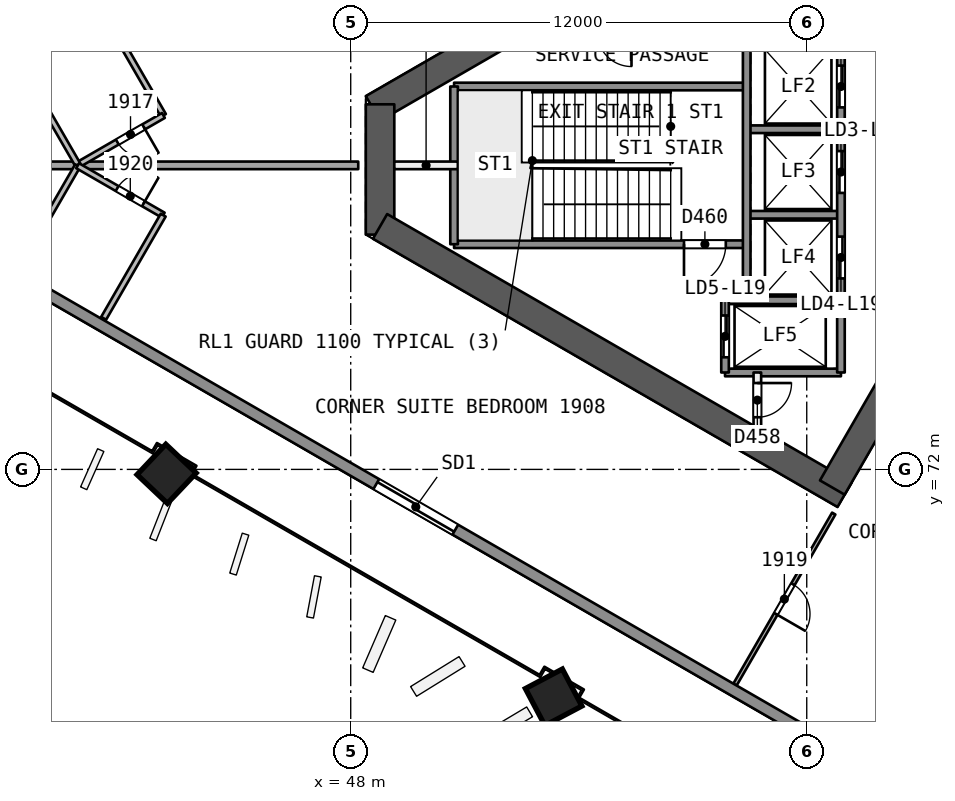
"""IFC4 building model, lengths in metres.
Left out: names, types, materials, properties, quantities, classifications, styles, units other than length and angle.
Written with IfcOpenShell. Run it as: python <this file> out.ifc"""

import sys

from ifc_helpers import new_model, si_unit, direction, frame, frame_2d, origin, origin_2d, place, context, subcontext, project, spatial, rectangle, extrude, element, fill, save


model = new_model("IFC4")
c1 = context("Model", 3, precision=1e-05, world=origin(), true_north=direction((0.0, 1.0)))
c2 = subcontext(c1, "Body", "Model", "MODEL_VIEW")
j1 = project(units=[si_unit("LENGTHUNIT", "METRE"), si_unit("PLANEANGLEUNIT", "RADIAN")], contexts=[c1])
p1 = place(None, origin())
s1 = spatial("IfcSite", under=j1, at=p1, CompositionType="ELEMENT")
p2 = place(p1, origin())
s2 = spatial("IfcBuilding", under=s1, at=p2, CompositionType="ELEMENT")
p3 = place(p2, frame((0.0, 0.0, 83.2)))
s3 = spatial("IfcBuildingStorey", under=s2, at=p3, CompositionType="ELEMENT", Elevation=83.2)
p4 = place(p3, frame((65.567, 80.0, 0.0), z_axis=(0.0, 0.0, 1.0), x_axis=(-0.499988615364, 0.866031976607, 0.0)))
e1 = element("IfcWall", 1, at=p4, inside=s3, PredefinedType="SHEAR", context=c2, shape_type="SweptSolid", body=[
    extrude(rectangle(XDim=10.163, YDim=0.75, at=frame_2d((5.082, 0.0))), origin(), (0.0, 0.0, 1.0), 3.7),
])
p5 = place(p4, frame((0.733, 0.0, 0.0)))
e2 = element("IfcOpeningElement", 2, at=p5, cuts=e1, PredefinedType="OPENING", context=c2, shape_type="SweptSolid", body=[
    extrude(rectangle(XDim=1.2, YDim=2.1, at=frame_2d((0.6, 1.05))), frame((0.0, 0.385, 0.0), z_axis=(0.0, -1.0, 0.0), x_axis=(1.0, 0.0, 0.0)), (0.0, 0.0, 1.0), 0.771),
])
p6 = place(p3, frame((60.673, 88.477, 0.0), z_axis=(0.0, 0.0, 1.0), x_axis=(-0.8660248072, -0.500001033313, 0.0)))
e3 = element("IfcWall", 3, at=p6, inside=s3, PredefinedType="SHEAR", context=c2, shape_type="SweptSolid", body=[
    extrude(rectangle(XDim=13.958, YDim=0.75, at=frame_2d((6.979, 0.0))), origin(), (0.0, 0.0, 1.0), 3.7),
])
p7 = place(p3, frame((48.772, 81.606, 0.0), z_axis=(0.0, 0.0, 1.0), x_axis=(0.0, -1.0, 0.0)))
e4 = element("IfcWall", 4, at=p7, inside=s3, PredefinedType="SHEAR", context=c2, shape_type="SweptSolid", body=[
    extrude(rectangle(XDim=3.429, YDim=0.75, at=frame_2d((1.714, 0.0))), origin(), (0.0, 0.0, 1.0), 3.7),
])
p8 = place(p3, frame((48.772, 78.394, 0.0), z_axis=(0.0, 0.0, 1.0), x_axis=(0.866028339916, -0.499994914436, 0.0)))
e5 = element("IfcWall", 5, at=p8, inside=s3, PredefinedType="SHEAR", context=c2, shape_type="SweptSolid", body=[
    extrude(rectangle(XDim=14.117, YDim=0.75, at=frame_2d((7.059, 0.0))), origin(), (0.0, 0.0, 1.0), 3.7),
])
p9 = place(p3, frame((60.673, 71.523, 0.0), z_axis=(0.0, 0.0, 1.0), x_axis=(0.499997052475, 0.866027105532, 0.0)))
e6 = element("IfcWall", 6, at=p9, inside=s3, PredefinedType="SHEAR", context=c2, shape_type="SweptSolid", body=[
    extrude(rectangle(XDim=10.005, YDim=0.75, at=frame_2d((5.002, 0.0))), origin(), (0.0, 0.0, 1.0), 3.7),
])
p10 = place(p9, frame((7.855, 0.0, 0.0)))
e7 = element("IfcOpeningElement", 7, at=p10, cuts=e6, PredefinedType="OPENING", context=c2, shape_type="SweptSolid", body=[
    extrude(rectangle(XDim=1.2, YDim=2.1, at=frame_2d((0.6, 1.05))), frame((0.0, 0.385, 0.0), z_axis=(0.0, -1.0, 0.0), x_axis=(1.0, 0.0, 0.0)), (0.0, 0.0, 1.0), 0.771),
])
p11 = place(p3, frame((43.121, 71.875, 0.0), z_axis=(0.02855911485, 0.006793507689, 0.999569019734), x_axis=(-0.865319840559, 0.500766443848, 0.021319996519)))
e8 = element("IfcColumn", 8, at=p11, inside=s3, PredefinedType="COLUMN", context=c2, shape_type="SweptSolid", body=[
    extrude(rectangle(XDim=1.1, YDim=1.1, at=origin_2d()), origin(), (0.0, 0.0, 1.0), 3.702),
])
p12 = place(p3, frame((53.317, 65.989, 0.0), z_axis=(0.019328516974, 0.012138044789, 0.999739504221), x_axis=(-0.865694061334, 0.500459928951, 0.010660754407)))
e9 = element("IfcColumn", 9, at=p12, inside=s3, PredefinedType="COLUMN", context=c2, shape_type="SweptSolid", body=[
    extrude(rectangle(XDim=1.1, YDim=1.1, at=origin_2d()), origin(), (0.0, 0.0, 1.0), 3.701),
])
p13 = place(p3, frame((41.504, 84.028, 0.0), z_axis=(0.0, 0.0, 1.0), x_axis=(0.499967424082, -0.866044210682, 0.0)))
e10 = element("IfcWall", 10, at=p13, inside=s3, PredefinedType="PARTITIONING", context=c2, shape_type="SweptSolid", body=[
    extrude(rectangle(XDim=3.135, YDim=0.15, at=frame_2d((1.567, 0.0))), origin(), (0.0, 0.0, 1.0), 3.2),
])
p14 = place(p3, frame((43.072, 81.313, 0.0), z_axis=(0.0, 0.0, 1.0), x_axis=(-0.866021400173, -0.500006934395, 0.0)))
e11 = element("IfcWall", 11, at=p14, inside=s3, PredefinedType="PARTITIONING", context=c2, shape_type="SweptSolid", body=[
    extrude(rectangle(XDim=2.6, YDim=0.15, at=frame_2d((1.3, 0.0))), origin(), (0.0, 0.0, 1.0), 3.2),
])
p15 = place(p14, frame((0.6, 0.0, 0.0)))
e12 = element("IfcOpeningElement", 12, at=p15, cuts=e11, PredefinedType="OPENING", context=c2, shape_type="SweptSolid", body=[
    extrude(rectangle(XDim=0.8, YDim=2.1, at=frame_2d((0.4, 1.05))), frame((0.0, 0.085, 0.0), z_axis=(0.0, -1.0, 0.0), x_axis=(1.0, 0.0, 0.0)), (0.0, 0.0, 1.0), 0.171),
])
p16 = place(p3, frame((40.82, 80.013, 0.0), z_axis=(0.0, 0.0, 1.0), x_axis=(-0.499995114243, 0.866028224559, 0.0)))
e13 = element("IfcWall", 13, at=p16, inside=s3, PredefinedType="PARTITIONING", context=c2, shape_type="SweptSolid", body=[
    extrude(rectangle(XDim=2.635, YDim=0.15, at=frame_2d((1.318, 0.0))), origin(), (0.0, 0.0, 1.0), 3.2),
])
p17 = place(p3, frame((39.502, 80.0, 0.0), z_axis=(0.0, 0.0, 1.0), x_axis=(1.0, 0.0, 0.0)))
e14 = element("IfcWall", 14, at=p17, inside=s3, PredefinedType="PARTITIONING", context=c2, shape_type="SweptSolid", body=[
    extrude(rectangle(XDim=8.696, YDim=0.2, at=frame_2d((4.348, 0.0))), origin(), (0.0, 0.0, 1.0), 3.2),
])
p18 = place(p3, frame((60.71, 70.838, 0.0), z_axis=(0.0, 0.0, 1.0), x_axis=(-0.499973171224, -0.866040892832, 0.0)))
e15 = element("IfcWall", 15, at=p18, inside=s3, PredefinedType="PARTITIONING", context=c2, shape_type="SweptSolid", body=[
    extrude(rectangle(XDim=5.198, YDim=0.1, at=frame_2d((2.599, 0.0))), origin(), (0.0, 0.0, 1.0), 3.2),
])
p19 = place(p18, frame((2.149, 0.0, 0.0)))
e16 = element("IfcOpeningElement", 16, at=p19, cuts=e15, PredefinedType="OPENING", context=c2, shape_type="SweptSolid", body=[
    extrude(rectangle(XDim=0.9, YDim=2.1, at=frame_2d((0.45, 1.05))), frame((0.0, 0.061, 0.0), z_axis=(0.0, -1.0, 0.0), x_axis=(1.0, 0.0, 0.0)), (0.0, 0.0, 1.0), 0.121),
])
p20 = place(p3, frame((39.502, 77.718, 0.0), z_axis=(0.0, 0.0, 1.0), x_axis=(0.499972156837, 0.866041478445, 0.0)))
e17 = element("IfcWall", 17, at=p20, inside=s3, PredefinedType="PARTITIONING", context=c2, shape_type="SweptSolid", body=[
    extrude(rectangle(XDim=2.624, YDim=0.15, at=frame_2d((1.312, 0.0))), origin(), (0.0, 0.0, 1.0), 3.2),
])
p21 = place(p3, frame((40.814, 79.99, 0.0), z_axis=(0.0, 0.0, 1.0), x_axis=(0.866062058628, -0.499936506574, 0.0)))
e18 = element("IfcWall", 18, at=p21, inside=s3, PredefinedType="PARTITIONING", context=c2, shape_type="SweptSolid", body=[
    extrude(rectangle(XDim=2.6, YDim=0.15, at=frame_2d((1.3, 0.0))), origin(), (0.0, 0.0, 1.0), 3.2),
])
p22 = place(p21, frame((1.2, 0.0, 0.0)))
e19 = element("IfcOpeningElement", 19, at=p22, cuts=e18, PredefinedType="OPENING", context=c2, shape_type="SweptSolid", body=[
    extrude(rectangle(XDim=0.8, YDim=2.1, at=frame_2d((0.4, 1.05))), frame((0.0, 0.085, 0.0), z_axis=(0.0, -1.0, 0.0), x_axis=(1.0, 0.0, 0.0)), (0.0, 0.0, 1.0), 0.171),
])
p23 = place(p3, frame((43.066, 78.69, 0.0), z_axis=(0.0, 0.0, 1.0), x_axis=(-0.499967424082, -0.866044210682, 0.0)))
e20 = element("IfcWall", 20, at=p23, inside=s3, PredefinedType="PARTITIONING", context=c2, shape_type="SweptSolid", body=[
    extrude(rectangle(XDim=3.135, YDim=0.15, at=frame_2d((1.567, 0.0))), origin(), (0.0, 0.0, 1.0), 3.2),
])
p24 = place(p3, frame((39.353, 83.005, 0.0), z_axis=(0.0, 0.0, 1.0), x_axis=(0.866025832118, 0.499999258104, 0.0)))
e21 = element("IfcWall", 21, at=p24, inside=s3, PredefinedType="SOLIDWALL", context=c2, shape_type="SweptSolid", body=[
    extrude(rectangle(XDim=58.737, YDim=0.3, at=frame_2d((29.368, 0.0))), origin(), (0.0, 0.0, 1.0), 3.2),
])
p25 = place(p24, frame((28.636, 0.0, 0.0)))
e22 = element("IfcOpeningElement", 22, at=p25, cuts=e21, PredefinedType="OPENING", context=c2, shape_type="SweptSolid", body=[
    extrude(rectangle(XDim=2.4, YDim=2.4, at=frame_2d((1.2, 1.2))), frame((0.0, 0.161, 0.0), z_axis=(0.0, -1.0, 0.0), x_axis=(1.0, 0.0, 0.0)), (0.0, 0.0, 1.0), 0.321),
])
p26 = place(p24, frame((33.936, 0.0, 0.0)))
e23 = element("IfcOpeningElement", 23, at=p26, cuts=e21, PredefinedType="OPENING", context=c2, shape_type="SweptSolid", body=[
    extrude(rectangle(XDim=2.4, YDim=2.4, at=frame_2d((1.2, 1.2))), frame((0.0, 0.161, 0.0), z_axis=(0.0, -1.0, 0.0), x_axis=(1.0, 0.0, 0.0)), (0.0, 0.0, 1.0), 0.321),
])
p27 = place(p24, frame((45.575, 0.0, 0.0)))
e24 = element("IfcOpeningElement", 24, at=p27, cuts=e21, PredefinedType="OPENING", context=c2, shape_type="SweptSolid", body=[
    extrude(rectangle(XDim=2.4, YDim=2.4, at=frame_2d((1.2, 1.2))), frame((0.0, 0.161, 0.0), z_axis=(0.0, -1.0, 0.0), x_axis=(1.0, 0.0, 0.0)), (0.0, 0.0, 1.0), 0.321),
])
p28 = place(p24, frame((22.868, 0.0, 0.0)))
e25 = element("IfcOpeningElement", 25, at=p28, cuts=e21, PredefinedType="OPENING", context=c2, shape_type="SweptSolid", body=[
    extrude(rectangle(XDim=2.4, YDim=2.4, at=frame_2d((1.2, 1.2))), frame((0.0, 0.161, 0.0), z_axis=(0.0, -1.0, 0.0), x_axis=(1.0, 0.0, 0.0)), (0.0, 0.0, 1.0), 0.321),
])
p29 = place(p24, frame((10.765, 0.0, 0.0)))
e26 = element("IfcOpeningElement", 26, at=p29, cuts=e21, PredefinedType="OPENING", context=c2, shape_type="SweptSolid", body=[
    extrude(rectangle(XDim=2.4, YDim=2.4, at=frame_2d((1.2, 1.2))), frame((0.0, 0.161, 0.0), z_axis=(0.0, -1.0, 0.0), x_axis=(1.0, 0.0, 0.0)), (0.0, 0.0, 1.0), 0.321),
])
p30 = place(p3, frame((90.221, 47.626, 0.0), z_axis=(0.0, 0.0, 1.0), x_axis=(-0.866025832118, 0.499999258104, 0.0)))
e27 = element("IfcWall", 27, at=p30, inside=s3, PredefinedType="SOLIDWALL", context=c2, shape_type="SweptSolid", body=[
    extrude(rectangle(XDim=58.737, YDim=0.3, at=frame_2d((29.368, 0.0))), origin(), (0.0, 0.0, 1.0), 3.2),
])
p31 = place(p30, frame((32.065, 0.0, 0.0)))
e28 = element("IfcOpeningElement", 28, at=p31, cuts=e27, PredefinedType="OPENING", context=c2, shape_type="SweptSolid", body=[
    extrude(rectangle(XDim=2.4, YDim=2.4, at=frame_2d((1.2, 1.2))), frame((0.0, 0.161, 0.0), z_axis=(0.0, -1.0, 0.0), x_axis=(1.0, 0.0, 0.0)), (0.0, 0.0, 1.0), 0.321),
])
p32 = place(p30, frame((45.575, 0.0, 0.0)))
e29 = element("IfcOpeningElement", 29, at=p32, cuts=e27, PredefinedType="OPENING", context=c2, shape_type="SweptSolid", body=[
    extrude(rectangle(XDim=2.4, YDim=2.4, at=frame_2d((1.2, 1.2))), frame((0.0, 0.161, 0.0), z_axis=(0.0, -1.0, 0.0), x_axis=(1.0, 0.0, 0.0)), (0.0, 0.0, 1.0), 0.321),
])
p33 = place(p30, frame((13.441, 0.0, 0.0)))
e30 = element("IfcOpeningElement", 30, at=p33, cuts=e27, PredefinedType="OPENING", context=c2, shape_type="SweptSolid", body=[
    extrude(rectangle(XDim=2.4, YDim=2.4, at=frame_2d((1.2, 1.2))), frame((0.0, 0.161, 0.0), z_axis=(0.0, -1.0, 0.0), x_axis=(1.0, 0.0, 0.0)), (0.0, 0.0, 1.0), 0.321),
])
p34 = place(p3, frame((58.42, 82.075, 0.0), z_axis=(0.0, 0.0, 1.0), x_axis=(-1.0, 0.0, 0.0)))
e31 = element("IfcWall", 31, at=p34, inside=s3, PredefinedType="SOLIDWALL", context=c2, shape_type="SweptSolid", body=[
    extrude(rectangle(XDim=7.7, YDim=0.2, at=frame_2d((3.85, 0.0))), origin(), (0.0, 0.0, 1.0), 3.2),
])
p35 = place(p3, frame((60.9, 80.95, 0.0), z_axis=(0.0, 0.0, 1.0), x_axis=(-1.0, 0.0, 0.0)))
e32 = element("IfcWall", 32, at=p35, inside=s3, PredefinedType="SOLIDWALL", context=c2, shape_type="SweptSolid", body=[
    extrude(rectangle(XDim=2.48, YDim=0.2, at=frame_2d((1.24, 0.0))), origin(), (0.0, 0.0, 1.0), 3.2),
])
p36 = place(p3, frame((50.82, 80.0, 0.0), z_axis=(0.0, 0.0, 1.0), x_axis=(-1.0, 0.0, 0.0)))
e33 = element("IfcWall", 33, at=p36, inside=s3, PredefinedType="PARTITIONING", context=c2, shape_type="SweptSolid", body=[
    extrude(rectangle(XDim=1.673, YDim=0.2, at=frame_2d((0.836, 0.0))), origin(), (0.0, 0.0, 1.0), 3.2),
])
p37 = place(p3, frame((60.9, 78.7, 0.0), z_axis=(0.0, 0.0, 1.0), x_axis=(-1.0, 0.0, 0.0)))
e34 = element("IfcWall", 34, at=p37, inside=s3, PredefinedType="SOLIDWALL", context=c2, shape_type="SweptSolid", body=[
    extrude(rectangle(XDim=2.48, YDim=0.2, at=frame_2d((1.24, 0.0))), origin(), (0.0, 0.0, 1.0), 3.2),
])
p38 = place(p3, frame((58.42, 77.925, 0.0), z_axis=(0.0, 0.0, 1.0), x_axis=(-1.0, 0.0, 0.0)))
e35 = element("IfcWall", 35, at=p38, inside=s3, PredefinedType="SOLIDWALL", context=c2, shape_type="SweptSolid", body=[
    extrude(rectangle(XDim=7.7, YDim=0.2, at=frame_2d((3.85, 0.0))), origin(), (0.0, 0.0, 1.0), 3.2),
])
p39 = place(p38, frame((0.55, 0.0, 0.0)))
e36 = element("IfcOpeningElement", 36, at=p39, cuts=e35, PredefinedType="OPENING", context=c2, shape_type="SweptSolid", body=[
    extrude(rectangle(XDim=1.1, YDim=2.1, at=frame_2d((0.55, 1.05))), frame((0.0, 0.11, 0.0), z_axis=(0.0, -1.0, 0.0), x_axis=(1.0, 0.0, 0.0)), (0.0, 0.0, 1.0), 0.221),
])
for number, where, z_axis, x_axis in (
    (37, (60.9, 76.45, 0.0), (0.0, 0.0, 1.0), (-1.0, 0.0, 0.0)),
    (38, (60.9, 74.55, 0.0), (0.0, 0.0, 1.0), (-1.0, 0.0, 0.0)),
):
    element("IfcWall", number, at=place(p3, frame(where, z_axis=z_axis, x_axis=x_axis)), inside=s3, PredefinedType="SOLIDWALL", context=c2, shape_type="SweptSolid", body=[
        extrude(rectangle(XDim=3.05, YDim=0.2, at=frame_2d((1.525, 0.0))), origin(), (0.0, 0.0, 1.0), 3.2),
    ])
p40 = place(p3, frame((60.9, 85.45, 0.0), z_axis=(0.0, 0.0, 1.0), x_axis=(0.0, -1.0, 0.0)))
e39 = element("IfcWall", 39, at=p40, inside=s3, PredefinedType="SOLIDWALL", context=c2, shape_type="SweptSolid", body=[
    extrude(rectangle(XDim=10.9, YDim=0.2, at=frame_2d((5.45, 0.0))), origin(), (0.0, 0.0, 1.0), 3.2),
])
p41 = place(p40, frame((0.575, 0.0, 0.0)))
e40 = element("IfcOpeningElement", 40, at=p41, cuts=e39, PredefinedType="OPENING", context=c2, shape_type="SweptSolid", body=[
    extrude(rectangle(XDim=1.1, YDim=2.1, at=frame_2d((0.55, 1.05))), frame((0.0, 0.11, 0.0), z_axis=(0.0, -1.0, 0.0), x_axis=(1.0, 0.0, 0.0)), (0.0, 0.0, 1.0), 0.221),
])
p42 = place(p40, frame((2.825, 0.0, 0.0)))
e41 = element("IfcOpeningElement", 41, at=p42, cuts=e39, PredefinedType="OPENING", context=c2, shape_type="SweptSolid", body=[
    extrude(rectangle(XDim=1.1, YDim=2.1, at=frame_2d((0.55, 1.05))), frame((0.0, 0.11, 0.0), z_axis=(0.0, -1.0, 0.0), x_axis=(1.0, 0.0, 0.0)), (0.0, 0.0, 1.0), 0.221),
])
p43 = place(p40, frame((5.075, 0.0, 0.0)))
e42 = element("IfcOpeningElement", 42, at=p43, cuts=e39, PredefinedType="OPENING", context=c2, shape_type="SweptSolid", body=[
    extrude(rectangle(XDim=1.1, YDim=2.1, at=frame_2d((0.55, 1.05))), frame((0.0, 0.11, 0.0), z_axis=(0.0, -1.0, 0.0), x_axis=(1.0, 0.0, 0.0)), (0.0, 0.0, 1.0), 0.221),
])
p44 = place(p40, frame((7.325, 0.0, 0.0)))
e43 = element("IfcOpeningElement", 43, at=p44, cuts=e39, PredefinedType="OPENING", context=c2, shape_type="SweptSolid", body=[
    extrude(rectangle(XDim=1.1, YDim=2.1, at=frame_2d((0.55, 1.05))), frame((0.0, 0.11, 0.0), z_axis=(0.0, -1.0, 0.0), x_axis=(1.0, 0.0, 0.0)), (0.0, 0.0, 1.0), 0.221),
])
p45 = place(p3, frame((58.7, 74.55, 0.0), z_axis=(0.0, 0.0, 1.0), x_axis=(0.0, -1.0, 0.0)))
e44 = element("IfcWall", 44, at=p45, inside=s3, PredefinedType="PARTITIONING", context=c2, shape_type="SweptSolid", body=[
    extrude(rectangle(XDim=1.455, YDim=0.2, at=frame_2d((0.728, 0.0))), origin(), (0.0, 0.0, 1.0), 3.2),
])
p46 = place(p45, frame((0.278, 0.0, 0.0)))
e45 = element("IfcOpeningElement", 45, at=p46, cuts=e44, PredefinedType="OPENING", context=c2, shape_type="SweptSolid", body=[
    extrude(rectangle(XDim=0.9, YDim=2.1, at=frame_2d((0.45, 1.05))), frame((0.0, 0.11, 0.0), z_axis=(0.0, -1.0, 0.0), x_axis=(1.0, 0.0, 0.0)), (0.0, 0.0, 1.0), 0.221),
])
p47 = place(p3, frame((58.42, 85.45, 0.0), z_axis=(0.0, 0.0, 1.0), x_axis=(0.0, -1.0, 0.0)))
e46 = element("IfcWall", 46, at=p47, inside=s3, PredefinedType="SOLIDWALL", context=c2, shape_type="SweptSolid", body=[
    extrude(rectangle(XDim=9.0, YDim=0.2, at=frame_2d((4.5, 0.0))), origin(), (0.0, 0.0, 1.0), 3.2),
])
p48 = place(p3, frame((57.85, 76.45, 0.0), z_axis=(0.0, 0.0, 1.0), x_axis=(0.0, -1.0, 0.0)))
e47 = element("IfcWall", 47, at=p48, inside=s3, PredefinedType="SOLIDWALL", context=c2, shape_type="SweptSolid", body=[
    extrude(rectangle(XDim=1.9, YDim=0.2, at=frame_2d((0.95, 0.0))), origin(), (0.0, 0.0, 1.0), 3.2),
])
p49 = place(p48, frame((0.4, 0.0, 0.0)))
e48 = element("IfcOpeningElement", 48, at=p49, cuts=e47, PredefinedType="OPENING", context=c2, shape_type="SweptSolid", body=[
    extrude(rectangle(XDim=1.1, YDim=2.1, at=frame_2d((0.55, 1.05))), frame((0.0, 0.11, 0.0), z_axis=(0.0, -1.0, 0.0), x_axis=(1.0, 0.0, 0.0)), (0.0, 0.0, 1.0), 0.221),
])
p50 = place(p3, frame((50.72, 82.075, 0.0), z_axis=(0.0, 0.0, 1.0), x_axis=(0.0, -1.0, 0.0)))
e49 = element("IfcWall", 49, at=p50, inside=s3, PredefinedType="SOLIDWALL", context=c2, shape_type="SweptSolid", body=[
    extrude(rectangle(XDim=4.15, YDim=0.2, at=frame_2d((2.075, 0.0))), origin(), (0.0, 0.0, 1.0), 3.2),
])
p51 = place(p15, origin())
e50 = element("IfcDoor", 50, at=p51, inside=s3, OperationType="SINGLE_SWING_LEFT", PredefinedType="NOTDEFINED", context=c2, shape_type="SweptSolid", body=[
    extrude(rectangle(XDim=0.8, YDim=2.1, at=frame_2d((0.4, 1.05))), frame((0.0, 0.025, 0.0), z_axis=(0.0, -1.0, 0.0), x_axis=(1.0, 0.0, 0.0)), (0.0, 0.0, 1.0), 0.05),
])
fill(e12, e50)
p52 = place(p19, origin())
e51 = element("IfcDoor", 51, at=p52, inside=s3, OperationType="SINGLE_SWING_RIGHT", PredefinedType="NOTDEFINED", context=c2, shape_type="SweptSolid", body=[
    extrude(rectangle(XDim=0.9, YDim=2.1, at=frame_2d((0.45, 1.05))), frame((0.0, 0.025, 0.0), z_axis=(0.0, -1.0, 0.0), x_axis=(1.0, 0.0, 0.0)), (0.0, 0.0, 1.0), 0.05),
])
fill(e16, e51)
p53 = place(p22, origin())
e52 = element("IfcDoor", 52, at=p53, inside=s3, OperationType="SINGLE_SWING_RIGHT", PredefinedType="NOTDEFINED", context=c2, shape_type="SweptSolid", body=[
    extrude(rectangle(XDim=0.8, YDim=2.1, at=frame_2d((0.4, 1.05))), frame((0.0, 0.025, 0.0), z_axis=(0.0, -1.0, 0.0), x_axis=(1.0, 0.0, 0.0)), (0.0, 0.0, 1.0), 0.05),
])
fill(e19, e52)
p54 = place(p32, origin())
e53 = element("IfcDoor", 53, at=p54, inside=s3, OperationType="SLIDING_TO_RIGHT", PredefinedType="NOTDEFINED", context=c2, shape_type="SweptSolid", body=[
    extrude(rectangle(XDim=2.4, YDim=2.4, at=frame_2d((1.2, 1.2))), frame((0.0, 0.025, 0.0), z_axis=(0.0, -1.0, 0.0), x_axis=(1.0, 0.0, 0.0)), (0.0, 0.0, 1.0), 0.05),
])
fill(e29, e53)
p55 = place(p42, origin())
e54 = element("IfcDoor", 54, at=p55, inside=s3, OperationType="SLIDING_TO_LEFT", PredefinedType="NOTDEFINED", context=c2, shape_type="SweptSolid", body=[
    extrude(rectangle(XDim=1.1, YDim=2.1, at=frame_2d((0.55, 1.05))), frame((0.0, 0.025, 0.0), z_axis=(0.0, -1.0, 0.0), x_axis=(1.0, 0.0, 0.0)), (0.0, 0.0, 1.0), 0.05),
])
fill(e41, e54)
p56 = place(p43, origin())
e55 = element("IfcDoor", 55, at=p56, inside=s3, OperationType="SLIDING_TO_RIGHT", PredefinedType="NOTDEFINED", context=c2, shape_type="SweptSolid", body=[
    extrude(rectangle(XDim=1.1, YDim=2.1, at=frame_2d((0.55, 1.05))), frame((0.0, 0.025, 0.0), z_axis=(0.0, -1.0, 0.0), x_axis=(1.0, 0.0, 0.0)), (0.0, 0.0, 1.0), 0.05),
])
fill(e42, e55)
p57 = place(p44, origin())
e56 = element("IfcDoor", 56, at=p57, inside=s3, OperationType="SLIDING_TO_LEFT", PredefinedType="NOTDEFINED", context=c2, shape_type="SweptSolid", body=[
    extrude(rectangle(XDim=1.1, YDim=2.1, at=frame_2d((0.55, 1.05))), frame((0.0, 0.025, 0.0), z_axis=(0.0, -1.0, 0.0), x_axis=(1.0, 0.0, 0.0)), (0.0, 0.0, 1.0), 0.05),
])
fill(e43, e56)
p58 = place(p49, origin())
e57 = element("IfcDoor", 57, at=p58, inside=s3, OperationType="SLIDING_TO_RIGHT", PredefinedType="NOTDEFINED", context=c2, shape_type="SweptSolid", body=[
    extrude(rectangle(XDim=1.1, YDim=2.1, at=frame_2d((0.55, 1.05))), frame((0.0, 0.025, 0.0), z_axis=(0.0, -1.0, 0.0), x_axis=(1.0, 0.0, 0.0)), (0.0, 0.0, 1.0), 0.05),
])
fill(e48, e57)
p59 = place(p46, origin())
e58 = element("IfcDoor", 58, at=p59, inside=s3, OperationType="SINGLE_SWING_LEFT", PredefinedType="NOTDEFINED", context=c2, shape_type="SweptSolid", body=[
    extrude(rectangle(XDim=0.9, YDim=2.1, at=frame_2d((0.45, 1.05))), frame((0.0, 0.025, 0.0), z_axis=(0.0, -1.0, 0.0), x_axis=(1.0, 0.0, 0.0)), (0.0, 0.0, 1.0), 0.05),
])
fill(e45, e58)
p60 = place(p39, origin())
e59 = element("IfcDoor", 59, at=p60, inside=s3, OperationType="SINGLE_SWING_RIGHT", PredefinedType="NOTDEFINED", context=c2, shape_type="SweptSolid", body=[
    extrude(rectangle(XDim=1.1, YDim=2.1, at=frame_2d((0.55, 1.05))), frame((0.0, 0.025, 0.0), z_axis=(0.0, -1.0, 0.0), x_axis=(1.0, 0.0, 0.0)), (0.0, 0.0, 1.0), 0.05),
])
fill(e36, e59)
save(model, sys.argv[1])
